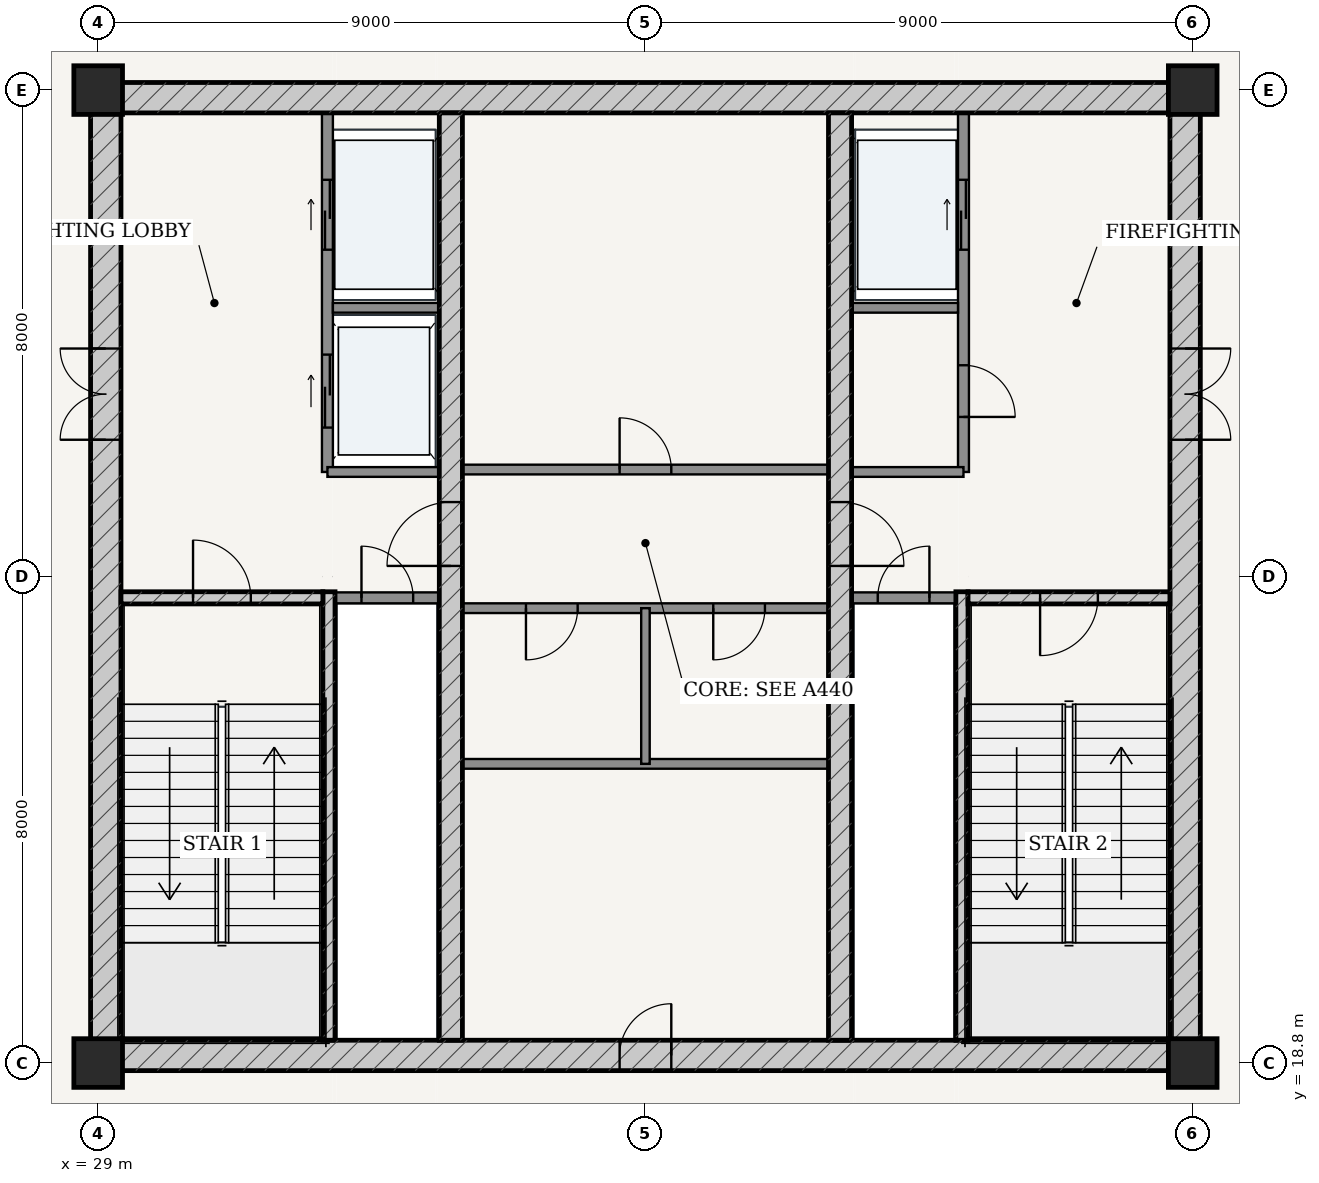
"""IFC4 building model, lengths in metres.
Left out: names, types, materials, properties, quantities, classifications, styles, units other than length and angle.
Written with IfcOpenShell. Run it as: python <this file> out.ifc"""

import sys

from ifc_helpers import new_model, si_unit, direction, frame, frame_2d, origin, origin_2d, place, context, subcontext, project, spatial, rectangle, extrude, source, transform, mapped, element, fill, save


model = new_model("IFC4")
c1 = context("Model", 3, precision=1e-05, world=origin(), true_north=direction((-0.2419218956, 0.970295726276)))
c2 = subcontext(c1, "Body", "Model", "MODEL_VIEW")
j1 = project(units=[si_unit("LENGTHUNIT", "METRE"), si_unit("PLANEANGLEUNIT", "RADIAN")], contexts=[c1])
p1 = place(None, origin())
s1 = spatial("IfcSite", under=j1, at=p1, CompositionType="ELEMENT")
p2 = place(p1, origin())
s2 = spatial("IfcBuilding", under=s1, at=p2, CompositionType="ELEMENT")
p3 = place(p2, frame((0.0, 0.0, 326.9)))
s3 = spatial("IfcBuildingStorey", under=s2, at=p3, CompositionType="ELEMENT", Elevation=326.9)
for number, where, z_axis, x_axis in (
    (1, (29.0, 18.8, 0.0), (0.0, 0.0, 1.0), (1.0, 0.0, 0.0)),
    (2, (47.0, 18.8, 0.0), (0.0, 0.0, 1.0), (1.0, 0.0, 0.0)),
    (3, (47.0, 34.8, 0.0), (0.0, 0.0, 1.0), (1.0, 0.0, 0.0)),
    (4, (29.0, 34.8, 0.0), (0.0, 0.0, 1.0), (1.0, 0.0, 0.0)),
):
    element("IfcColumn", number, at=place(p3, frame(where, z_axis=z_axis, x_axis=x_axis)), inside=s3, PredefinedType="COLUMN", context=c2, shape_type="SweptSolid", body=[
        extrude(rectangle(XDim=0.8, YDim=0.8, at=origin_2d()), origin(), (0.0, 0.0, 1.0), 5.2),
    ])
p4 = place(p3, frame((28.875, 18.925, 0.0), z_axis=(0.0, 0.0, 1.0), x_axis=(1.0, 0.0, 0.0)))
e5 = element("IfcWall", 5, at=p4, inside=s3, PredefinedType="SHEAR", context=c2, shape_type="SweptSolid", body=[
    extrude(rectangle(XDim=18.25, YDim=0.5, at=frame_2d((9.125, 0.0))), origin(), (0.0, 0.0, 1.0), 4.78),
])
p5 = place(p4, frame((8.7, 0.0, 0.0)))
e6 = element("IfcOpeningElement", 6, at=p5, cuts=e5, PredefinedType="OPENING", context=c2, shape_type="SweptSolid", body=[
    extrude(rectangle(XDim=0.85, YDim=2.1, at=frame_2d((0.425, 1.05))), frame((0.0, 0.26, 0.0), z_axis=(0.0, -1.0, 0.0), x_axis=(1.0, 0.0, 0.0)), (0.0, 0.0, 1.0), 0.52),
])
p6 = place(p3, frame((28.875, 34.675, 0.0), z_axis=(0.0, 0.0, 1.0), x_axis=(1.0, 0.0, 0.0)))
e7 = element("IfcWall", 7, at=p6, inside=s3, PredefinedType="SHEAR", context=c2, shape_type="SweptSolid", body=[
    extrude(rectangle(XDim=18.25, YDim=0.5, at=frame_2d((9.125, 0.0))), origin(), (0.0, 0.0, 1.0), 4.78),
])
p7 = place(p3, frame((29.125, 19.175, 0.0), z_axis=(0.0, 0.0, 1.0), x_axis=(0.0, 1.0, 0.0)))
e8 = element("IfcWall", 8, at=p7, inside=s3, PredefinedType="SHEAR", context=c2, shape_type="SweptSolid", body=[
    extrude(rectangle(XDim=15.25, YDim=0.5, at=frame_2d((7.625, 0.0))), origin(), (0.0, 0.0, 1.0), 4.78),
])
p8 = place(p7, frame((9.875, 0.0, 0.0)))
e9 = element("IfcOpeningElement", 9, at=p8, cuts=e8, PredefinedType="OPENING", context=c2, shape_type="SweptSolid", body=[
    extrude(rectangle(XDim=1.5, YDim=2.2, at=frame_2d((0.75, 1.1))), frame((0.0, 0.26, 0.0), z_axis=(0.0, -1.0, 0.0), x_axis=(1.0, 0.0, 0.0)), (0.0, 0.0, 1.0), 0.52),
])
p9 = place(p3, frame((46.875, 19.175, 0.0), z_axis=(0.0, 0.0, 1.0), x_axis=(0.0, 1.0, 0.0)))
e10 = element("IfcWall", 10, at=p9, inside=s3, PredefinedType="SHEAR", context=c2, shape_type="SweptSolid", body=[
    extrude(rectangle(XDim=15.25, YDim=0.5, at=frame_2d((7.625, 0.0))), origin(), (0.0, 0.0, 1.0), 4.78),
])
p10 = place(p9, frame((9.875, 0.0, 0.0)))
e11 = element("IfcOpeningElement", 11, at=p10, cuts=e10, PredefinedType="OPENING", context=c2, shape_type="SweptSolid", body=[
    extrude(rectangle(XDim=1.5, YDim=2.2, at=frame_2d((0.75, 1.1))), frame((0.0, 0.26, 0.0), z_axis=(0.0, -1.0, 0.0), x_axis=(1.0, 0.0, 0.0)), (0.0, 0.0, 1.0), 0.52),
])
p11 = place(p3, frame((32.795, 19.175, 0.0), z_axis=(0.0, 0.0, 1.0), x_axis=(0.0, 1.0, 0.0)))
e12 = element("IfcWall", 12, at=p11, inside=s3, PredefinedType="SOLIDWALL", context=c2, shape_type="SweptSolid", body=[
    extrude(rectangle(XDim=7.375, YDim=0.2, at=frame_2d((3.688, 0.0))), origin(), (0.0, 0.0, 1.0), 4.78),
])
p12 = place(p3, frame((29.375, 26.45, 0.0), z_axis=(0.0, 0.0, 1.0), x_axis=(1.0, 0.0, 0.0)))
e13 = element("IfcWall", 13, at=p12, inside=s3, PredefinedType="SOLIDWALL", context=c2, shape_type="SweptSolid", body=[
    extrude(rectangle(XDim=3.32, YDim=0.2, at=frame_2d((1.66, 0.0))), origin(), (0.0, 0.0, 1.0), 4.78),
])
p13 = place(p12, frame((1.185, 0.0, 0.0)))
e14 = element("IfcOpeningElement", 14, at=p13, cuts=e13, PredefinedType="OPENING", context=c2, shape_type="SweptSolid", body=[
    extrude(rectangle(XDim=0.95, YDim=2.15, at=frame_2d((0.475, 1.075))), frame((0.0, 0.11, 0.0), z_axis=(0.0, -1.0, 0.0), x_axis=(1.0, 0.0, 0.0)), (0.0, 0.0, 1.0), 0.22),
])
p14 = place(p3, frame((43.205, 19.175, 0.0), z_axis=(0.0, 0.0, 1.0), x_axis=(0.0, 1.0, 0.0)))
e15 = element("IfcWall", 15, at=p14, inside=s3, PredefinedType="SOLIDWALL", context=c2, shape_type="SweptSolid", body=[
    extrude(rectangle(XDim=7.375, YDim=0.2, at=frame_2d((3.688, 0.0))), origin(), (0.0, 0.0, 1.0), 4.78),
])
p15 = place(p3, frame((43.305, 26.45, 0.0), z_axis=(0.0, 0.0, 1.0), x_axis=(1.0, 0.0, 0.0)))
e16 = element("IfcWall", 16, at=p15, inside=s3, PredefinedType="SOLIDWALL", context=c2, shape_type="SweptSolid", body=[
    extrude(rectangle(XDim=3.32, YDim=0.2, at=frame_2d((1.66, 0.0))), origin(), (0.0, 0.0, 1.0), 4.78),
])
p16 = place(p15, frame((1.185, 0.0, 0.0)))
e17 = element("IfcOpeningElement", 17, at=p16, cuts=e16, PredefinedType="OPENING", context=c2, shape_type="SweptSolid", body=[
    extrude(rectangle(XDim=0.95, YDim=2.15, at=frame_2d((0.475, 1.075))), frame((0.0, 0.11, 0.0), z_axis=(0.0, -1.0, 0.0), x_axis=(1.0, 0.0, 0.0)), (0.0, 0.0, 1.0), 0.22),
])
p17 = place(p3, frame((34.8, 19.175, 0.0), z_axis=(0.0, 0.0, 1.0), x_axis=(0.0, 1.0, 0.0)))
e18 = element("IfcWall", 18, at=p17, inside=s3, PredefinedType="SHEAR", context=c2, shape_type="SweptSolid", body=[
    extrude(rectangle(XDim=15.25, YDim=0.38, at=frame_2d((7.625, 0.0))), origin(), (0.0, 0.0, 1.0), 4.78),
])
p18 = place(p17, frame((7.8, 0.0, 0.0)))
e19 = element("IfcOpeningElement", 19, at=p18, cuts=e18, PredefinedType="OPENING", context=c2, shape_type="SweptSolid", body=[
    extrude(rectangle(XDim=1.05, YDim=2.15, at=frame_2d((0.525, 1.075))), frame((0.0, 0.2, 0.0), z_axis=(0.0, -1.0, 0.0), x_axis=(1.0, 0.0, 0.0)), (0.0, 0.0, 1.0), 0.4),
])
p19 = place(p3, frame((41.2, 19.175, 0.0), z_axis=(0.0, 0.0, 1.0), x_axis=(0.0, 1.0, 0.0)))
e20 = element("IfcWall", 20, at=p19, inside=s3, PredefinedType="SHEAR", context=c2, shape_type="SweptSolid", body=[
    extrude(rectangle(XDim=15.25, YDim=0.38, at=frame_2d((7.625, 0.0))), origin(), (0.0, 0.0, 1.0), 4.78),
])
p20 = place(p19, frame((7.8, 0.0, 0.0)))
e21 = element("IfcOpeningElement", 21, at=p20, cuts=e20, PredefinedType="OPENING", context=c2, shape_type="SweptSolid", body=[
    extrude(rectangle(XDim=1.05, YDim=2.15, at=frame_2d((0.525, 1.075))), frame((0.0, 0.2, 0.0), z_axis=(0.0, -1.0, 0.0), x_axis=(1.0, 0.0, 0.0)), (0.0, 0.0, 1.0), 0.4),
])
p21 = place(p3, frame((32.9, 26.45, 0.0), z_axis=(0.0, 0.0, 1.0), x_axis=(1.0, 0.0, 0.0)))
e22 = element("IfcWall", 22, at=p21, inside=s3, PredefinedType="PARTITIONING", context=c2, shape_type="SweptSolid", body=[
    extrude(rectangle(XDim=1.71, YDim=0.18, at=frame_2d((0.855, 0.0))), origin(), (0.0, 0.0, 1.0), 4.78),
])
p22 = place(p21, frame((0.43, 0.0, 0.0)))
e23 = element("IfcOpeningElement", 23, at=p22, cuts=e22, PredefinedType="OPENING", context=c2, shape_type="SweptSolid", body=[
    extrude(rectangle(XDim=0.85, YDim=2.1, at=frame_2d((0.425, 1.05))), frame((0.0, 0.1, 0.0), z_axis=(0.0, -1.0, 0.0), x_axis=(1.0, 0.0, 0.0)), (0.0, 0.0, 1.0), 0.2),
])
p23 = place(p3, frame((41.39, 26.45, 0.0), z_axis=(0.0, 0.0, 1.0), x_axis=(1.0, 0.0, 0.0)))
e24 = element("IfcWall", 24, at=p23, inside=s3, PredefinedType="PARTITIONING", context=c2, shape_type="SweptSolid", body=[
    extrude(rectangle(XDim=1.71, YDim=0.18, at=frame_2d((0.855, 0.0))), origin(), (0.0, 0.0, 1.0), 4.78),
])
p24 = place(p23, frame((0.43, 0.0, 0.0)))
e25 = element("IfcOpeningElement", 25, at=p24, cuts=e24, PredefinedType="OPENING", context=c2, shape_type="SweptSolid", body=[
    extrude(rectangle(XDim=0.85, YDim=2.1, at=frame_2d((0.425, 1.05))), frame((0.0, 0.1, 0.0), z_axis=(0.0, -1.0, 0.0), x_axis=(1.0, 0.0, 0.0)), (0.0, 0.0, 1.0), 0.2),
])
p25 = place(p3, frame((32.77, 28.52, 0.0), z_axis=(0.0, 0.0, 1.0), x_axis=(0.0, 1.0, 0.0)))
e26 = element("IfcWall", 26, at=p25, inside=s3, PredefinedType="PARTITIONING", context=c2, shape_type="SweptSolid", body=[
    extrude(rectangle(XDim=5.905, YDim=0.18, at=frame_2d((2.953, 0.0))), origin(), (0.0, 0.0, 1.0), 4.78),
])
p26 = place(p25, frame((3.655, 0.0, 0.0)))
e27 = element("IfcOpeningElement", 27, at=p26, cuts=e26, PredefinedType="OPENING", context=c2, shape_type="SweptSolid", body=[
    extrude(rectangle(XDim=1.15, YDim=2.2, at=frame_2d((0.575, 1.1))), frame((0.0, 0.1, 0.0), z_axis=(0.0, -1.0, 0.0), x_axis=(1.0, 0.0, 0.0)), (0.0, 0.0, 1.0), 0.2),
])
p27 = place(p25, frame((0.73, 0.0, 0.0)))
e28 = element("IfcOpeningElement", 28, at=p27, cuts=e26, PredefinedType="OPENING", context=c2, shape_type="SweptSolid", body=[
    extrude(rectangle(XDim=1.2, YDim=2.25, at=frame_2d((0.6, 1.125))), frame((0.0, 0.1, 0.0), z_axis=(0.0, -1.0, 0.0), x_axis=(1.0, 0.0, 0.0)), (0.0, 0.0, 1.0), 0.2),
])
p28 = place(p3, frame((32.86, 31.22, 0.0), z_axis=(0.0, 0.0, 1.0), x_axis=(1.0, 0.0, 0.0)))
e29 = element("IfcWall", 29, at=p28, inside=s3, PredefinedType="PARTITIONING", context=c2, shape_type="SweptSolid", body=[
    extrude(rectangle(XDim=1.75, YDim=0.16, at=frame_2d((0.875, 0.0))), origin(), (0.0, 0.0, 1.0), 4.78),
])
p29 = place(p3, frame((32.77, 28.52, 0.0), z_axis=(0.0, 0.0, 1.0), x_axis=(1.0, 0.0, 0.0)))
e30 = element("IfcWall", 30, at=p29, inside=s3, PredefinedType="PARTITIONING", context=c2, shape_type="SweptSolid", body=[
    extrude(rectangle(XDim=1.84, YDim=0.16, at=frame_2d((0.92, 0.0))), origin(), (0.0, 0.0, 1.0), 4.78),
])
p30 = place(p3, frame((43.23, 28.52, 0.0), z_axis=(0.0, 0.0, 1.0), x_axis=(0.0, 1.0, 0.0)))
e31 = element("IfcWall", 31, at=p30, inside=s3, PredefinedType="PARTITIONING", context=c2, shape_type="SweptSolid", body=[
    extrude(rectangle(XDim=5.905, YDim=0.18, at=frame_2d((2.953, 0.0))), origin(), (0.0, 0.0, 1.0), 4.78),
])
p31 = place(p30, frame((0.905, 0.0, 0.0)))
e32 = element("IfcOpeningElement", 32, at=p31, cuts=e31, PredefinedType="OPENING", context=c2, shape_type="SweptSolid", body=[
    extrude(rectangle(XDim=0.85, YDim=2.1, at=frame_2d((0.425, 1.05))), frame((0.0, 0.1, 0.0), z_axis=(0.0, -1.0, 0.0), x_axis=(1.0, 0.0, 0.0)), (0.0, 0.0, 1.0), 0.2),
])
p32 = place(p30, frame((3.655, 0.0, 0.0)))
e33 = element("IfcOpeningElement", 33, at=p32, cuts=e31, PredefinedType="OPENING", context=c2, shape_type="SweptSolid", body=[
    extrude(rectangle(XDim=1.15, YDim=2.2, at=frame_2d((0.575, 1.1))), frame((0.0, 0.1, 0.0), z_axis=(0.0, -1.0, 0.0), x_axis=(1.0, 0.0, 0.0)), (0.0, 0.0, 1.0), 0.2),
])
p33 = place(p3, frame((41.39, 31.22, 0.0), z_axis=(0.0, 0.0, 1.0), x_axis=(1.0, 0.0, 0.0)))
e34 = element("IfcWall", 34, at=p33, inside=s3, PredefinedType="PARTITIONING", context=c2, shape_type="SweptSolid", body=[
    extrude(rectangle(XDim=1.75, YDim=0.16, at=frame_2d((0.875, 0.0))), origin(), (0.0, 0.0, 1.0), 4.78),
])
p34 = place(p3, frame((41.39, 28.52, 0.0), z_axis=(0.0, 0.0, 1.0), x_axis=(1.0, 0.0, 0.0)))
e35 = element("IfcWall", 35, at=p34, inside=s3, PredefinedType="PARTITIONING", context=c2, shape_type="SweptSolid", body=[
    extrude(rectangle(XDim=1.84, YDim=0.16, at=frame_2d((0.92, 0.0))), origin(), (0.0, 0.0, 1.0), 4.78),
])
p35 = place(p3, frame((34.99, 28.56, 0.0), z_axis=(0.0, 0.0, 1.0), x_axis=(1.0, 0.0, 0.0)))
e36 = element("IfcWall", 36, at=p35, inside=s3, PredefinedType="PARTITIONING", context=c2, shape_type="SweptSolid", body=[
    extrude(rectangle(XDim=6.02, YDim=0.16, at=frame_2d((3.01, 0.0))), origin(), (0.0, 0.0, 1.0), 4.78),
])
p36 = place(p35, frame((2.585, 0.0, 0.0)))
e37 = element("IfcOpeningElement", 37, at=p36, cuts=e36, PredefinedType="OPENING", context=c2, shape_type="SweptSolid", body=[
    extrude(rectangle(XDim=0.85, YDim=2.1, at=frame_2d((0.425, 1.05))), frame((0.0, 0.09, 0.0), z_axis=(0.0, -1.0, 0.0), x_axis=(1.0, 0.0, 0.0)), (0.0, 0.0, 1.0), 0.18),
])
p37 = place(p3, frame((34.99, 26.28, 0.0), z_axis=(0.0, 0.0, 1.0), x_axis=(1.0, 0.0, 0.0)))
e38 = element("IfcWall", 38, at=p37, inside=s3, PredefinedType="PARTITIONING", context=c2, shape_type="SweptSolid", body=[
    extrude(rectangle(XDim=6.02, YDim=0.16, at=frame_2d((3.01, 0.0))), origin(), (0.0, 0.0, 1.0), 4.78),
])
p38 = place(p37, frame((1.045, 0.0, 0.0)))
e39 = element("IfcOpeningElement", 39, at=p38, cuts=e38, PredefinedType="OPENING", context=c2, shape_type="SweptSolid", body=[
    extrude(rectangle(XDim=0.85, YDim=2.1, at=frame_2d((0.425, 1.05))), frame((0.0, 0.09, 0.0), z_axis=(0.0, -1.0, 0.0), x_axis=(1.0, 0.0, 0.0)), (0.0, 0.0, 1.0), 0.18),
])
p39 = place(p37, frame((4.125, 0.0, 0.0)))
e40 = element("IfcOpeningElement", 40, at=p39, cuts=e38, PredefinedType="OPENING", context=c2, shape_type="SweptSolid", body=[
    extrude(rectangle(XDim=0.85, YDim=2.1, at=frame_2d((0.425, 1.05))), frame((0.0, 0.09, 0.0), z_axis=(0.0, -1.0, 0.0), x_axis=(1.0, 0.0, 0.0)), (0.0, 0.0, 1.0), 0.18),
])
p40 = place(p3, frame((34.99, 23.72, 0.0), z_axis=(0.0, 0.0, 1.0), x_axis=(1.0, 0.0, 0.0)))
e41 = element("IfcWall", 41, at=p40, inside=s3, PredefinedType="PARTITIONING", context=c2, shape_type="SweptSolid", body=[
    extrude(rectangle(XDim=6.02, YDim=0.16, at=frame_2d((3.01, 0.0))), origin(), (0.0, 0.0, 1.0), 4.78),
])
p41 = place(p3, frame((38.0, 23.72, 0.0), z_axis=(0.0, 0.0, 1.0), x_axis=(0.0, 1.0, 0.0)))
e42 = element("IfcWall", 42, at=p41, inside=s3, PredefinedType="PARTITIONING", context=c2, shape_type="SweptSolid", body=[
    extrude(rectangle(XDim=2.56, YDim=0.14, at=frame_2d((1.28, 0.0))), origin(), (0.0, 0.0, 1.0), 4.78),
])
m1 = source(origin(), c2, "Body", "SweptSolid", [
    extrude(rectangle(XDim=1.5, YDim=2.2, at=frame_2d((0.75, 1.1))), frame((0.0, 0.025, 0.0), z_axis=(0.0, -1.0, 0.0), x_axis=(1.0, 0.0, 0.0)), (0.0, 0.0, 1.0), 0.05),
])
p42 = place(p8, origin())
e43 = element("IfcDoor", 43, at=p42, inside=s3, OperationType="DOUBLE_DOOR_SINGLE_SWING", PredefinedType="DOOR", context=c2, shape_type="MappedRepresentation", body=[
    mapped(m1, transform((0.0, 0.0, 0.0), scale=1.0)),
])
fill(e9, e43)
p43 = place(p10, frame((1.5, 0.0, 0.0), z_axis=(0.0, 0.0, 1.0), x_axis=(-1.0, 0.0, 0.0)))
e44 = element("IfcDoor", 44, at=p43, inside=s3, OperationType="DOUBLE_DOOR_SINGLE_SWING", PredefinedType="DOOR", context=c2, shape_type="MappedRepresentation", body=[
    mapped(m1, transform((0.0, 0.0, 0.0), scale=1.0)),
])
fill(e11, e44)
m2 = source(origin(), c2, "Body", "SweptSolid", [
    extrude(rectangle(XDim=1.05, YDim=2.15, at=frame_2d((0.525, 1.075))), frame((0.0, 0.025, 0.0), z_axis=(0.0, -1.0, 0.0), x_axis=(1.0, 0.0, 0.0)), (0.0, 0.0, 1.0), 0.05),
])
p44 = place(p18, origin())
e45 = element("IfcDoor", 45, at=p44, inside=s3, OperationType="SINGLE_SWING_LEFT", PredefinedType="DOOR", context=c2, shape_type="MappedRepresentation", body=[
    mapped(m2, transform((0.0, 0.0, 0.0), scale=1.0)),
])
fill(e19, e45)
p45 = place(p20, frame((1.05, 0.0, 0.0), z_axis=(0.0, 0.0, 1.0), x_axis=(-1.0, 0.0, 0.0)))
e46 = element("IfcDoor", 46, at=p45, inside=s3, OperationType="SINGLE_SWING_RIGHT", PredefinedType="DOOR", context=c2, shape_type="MappedRepresentation", body=[
    mapped(m2, transform((0.0, 0.0, 0.0), scale=1.0)),
])
fill(e21, e46)
m3 = source(origin(), c2, "Body", "SweptSolid", [
    extrude(rectangle(XDim=0.95, YDim=2.15, at=frame_2d((0.475, 1.075))), frame((0.0, 0.025, 0.0), z_axis=(0.0, -1.0, 0.0), x_axis=(1.0, 0.0, 0.0)), (0.0, 0.0, 1.0), 0.05),
])
p46 = place(p13, origin())
e47 = element("IfcDoor", 47, at=p46, inside=s3, OperationType="SINGLE_SWING_LEFT", PredefinedType="DOOR", context=c2, shape_type="MappedRepresentation", body=[
    mapped(m3, transform((0.0, 0.0, 0.0), scale=1.0)),
])
fill(e14, e47)
p47 = place(p16, frame((0.95, 0.0, 0.0), z_axis=(0.0, 0.0, 1.0), x_axis=(-1.0, 0.0, 0.0)))
e48 = element("IfcDoor", 48, at=p47, inside=s3, OperationType="SINGLE_SWING_RIGHT", PredefinedType="DOOR", context=c2, shape_type="MappedRepresentation", body=[
    mapped(m3, transform((0.0, 0.0, 0.0), scale=1.0)),
])
fill(e17, e48)
m4 = source(origin(), c2, "Body", "SweptSolid", [
    extrude(rectangle(XDim=0.85, YDim=2.1, at=frame_2d((0.425, 1.05))), frame((0.0, 0.025, 0.0), z_axis=(0.0, -1.0, 0.0), x_axis=(1.0, 0.0, 0.0)), (0.0, 0.0, 1.0), 0.05),
])
p48 = place(p22, origin())
e49 = element("IfcDoor", 49, at=p48, inside=s3, OperationType="SINGLE_SWING_LEFT", PredefinedType="DOOR", context=c2, shape_type="MappedRepresentation", body=[
    mapped(m4, transform((0.0, 0.0, 0.0), scale=1.0)),
])
fill(e23, e49)
p49 = place(p24, origin())
e50 = element("IfcDoor", 50, at=p49, inside=s3, OperationType="SINGLE_SWING_RIGHT", PredefinedType="DOOR", context=c2, shape_type="MappedRepresentation", body=[
    mapped(m4, transform((0.0, 0.0, 0.0), scale=1.0)),
])
fill(e25, e50)
p50 = place(p31, frame((0.85, 0.0, 0.0), z_axis=(0.0, 0.0, 1.0), x_axis=(-1.0, 0.0, 0.0)))
e51 = element("IfcDoor", 51, at=p50, inside=s3, OperationType="SINGLE_SWING_RIGHT", PredefinedType="DOOR", context=c2, shape_type="MappedRepresentation", body=[
    mapped(m4, transform((0.0, 0.0, 0.0), scale=1.0)),
])
fill(e32, e51)
p51 = place(p36, origin())
e52 = element("IfcDoor", 52, at=p51, inside=s3, OperationType="SINGLE_SWING_LEFT", PredefinedType="DOOR", context=c2, shape_type="MappedRepresentation", body=[
    mapped(m4, transform((0.0, 0.0, 0.0), scale=1.0)),
])
fill(e37, e52)
p52 = place(p38, frame((0.85, 0.0, 0.0), z_axis=(0.0, 0.0, 1.0), x_axis=(-1.0, 0.0, 0.0)))
e53 = element("IfcDoor", 53, at=p52, inside=s3, OperationType="SINGLE_SWING_RIGHT", PredefinedType="DOOR", context=c2, shape_type="MappedRepresentation", body=[
    mapped(m4, transform((0.0, 0.0, 0.0), scale=1.0)),
])
fill(e39, e53)
p53 = place(p39, frame((0.85, 0.0, 0.0), z_axis=(0.0, 0.0, 1.0), x_axis=(-1.0, 0.0, 0.0)))
e54 = element("IfcDoor", 54, at=p53, inside=s3, OperationType="SINGLE_SWING_RIGHT", PredefinedType="DOOR", context=c2, shape_type="MappedRepresentation", body=[
    mapped(m4, transform((0.0, 0.0, 0.0), scale=1.0)),
])
fill(e40, e54)
p54 = place(p5, origin())
e55 = element("IfcDoor", 55, at=p54, inside=s3, OperationType="SINGLE_SWING_RIGHT", PredefinedType="DOOR", context=c2, shape_type="MappedRepresentation", body=[
    mapped(m4, transform((0.0, 0.0, 0.0), scale=1.0)),
])
fill(e6, e55)
m5 = source(origin(), c2, "Body", "SweptSolid", [
    extrude(rectangle(XDim=1.15, YDim=2.2, at=frame_2d((0.575, 1.1))), frame((0.0, 0.025, 0.0), z_axis=(0.0, -1.0, 0.0), x_axis=(1.0, 0.0, 0.0)), (0.0, 0.0, 1.0), 0.05),
])
p55 = place(p26, origin())
e56 = element("IfcDoor", 56, at=p55, inside=s3, OperationType="DOUBLE_DOOR_SLIDING", PredefinedType="DOOR", context=c2, shape_type="MappedRepresentation", body=[
    mapped(m5, transform((0.0, 0.0, 0.0), scale=1.0)),
])
fill(e27, e56)
p56 = place(p32, origin())
e57 = element("IfcDoor", 57, at=p56, inside=s3, OperationType="DOUBLE_DOOR_SLIDING", PredefinedType="DOOR", context=c2, shape_type="MappedRepresentation", body=[
    mapped(m5, transform((0.0, 0.0, 0.0), scale=1.0)),
])
fill(e33, e57)
m6 = source(origin(), c2, "Body", "SweptSolid", [
    extrude(rectangle(XDim=1.2, YDim=2.25, at=frame_2d((0.6, 1.125))), frame((0.0, 0.025, 0.0), z_axis=(0.0, -1.0, 0.0), x_axis=(1.0, 0.0, 0.0)), (0.0, 0.0, 1.0), 0.05),
])
p57 = place(p27, origin())
e58 = element("IfcDoor", 58, at=p57, inside=s3, OperationType="DOUBLE_DOOR_SLIDING", PredefinedType="DOOR", context=c2, shape_type="MappedRepresentation", body=[
    mapped(m6, transform((0.0, 0.0, 0.0), scale=1.0)),
])
fill(e28, e58)
save(model, sys.argv[1])
